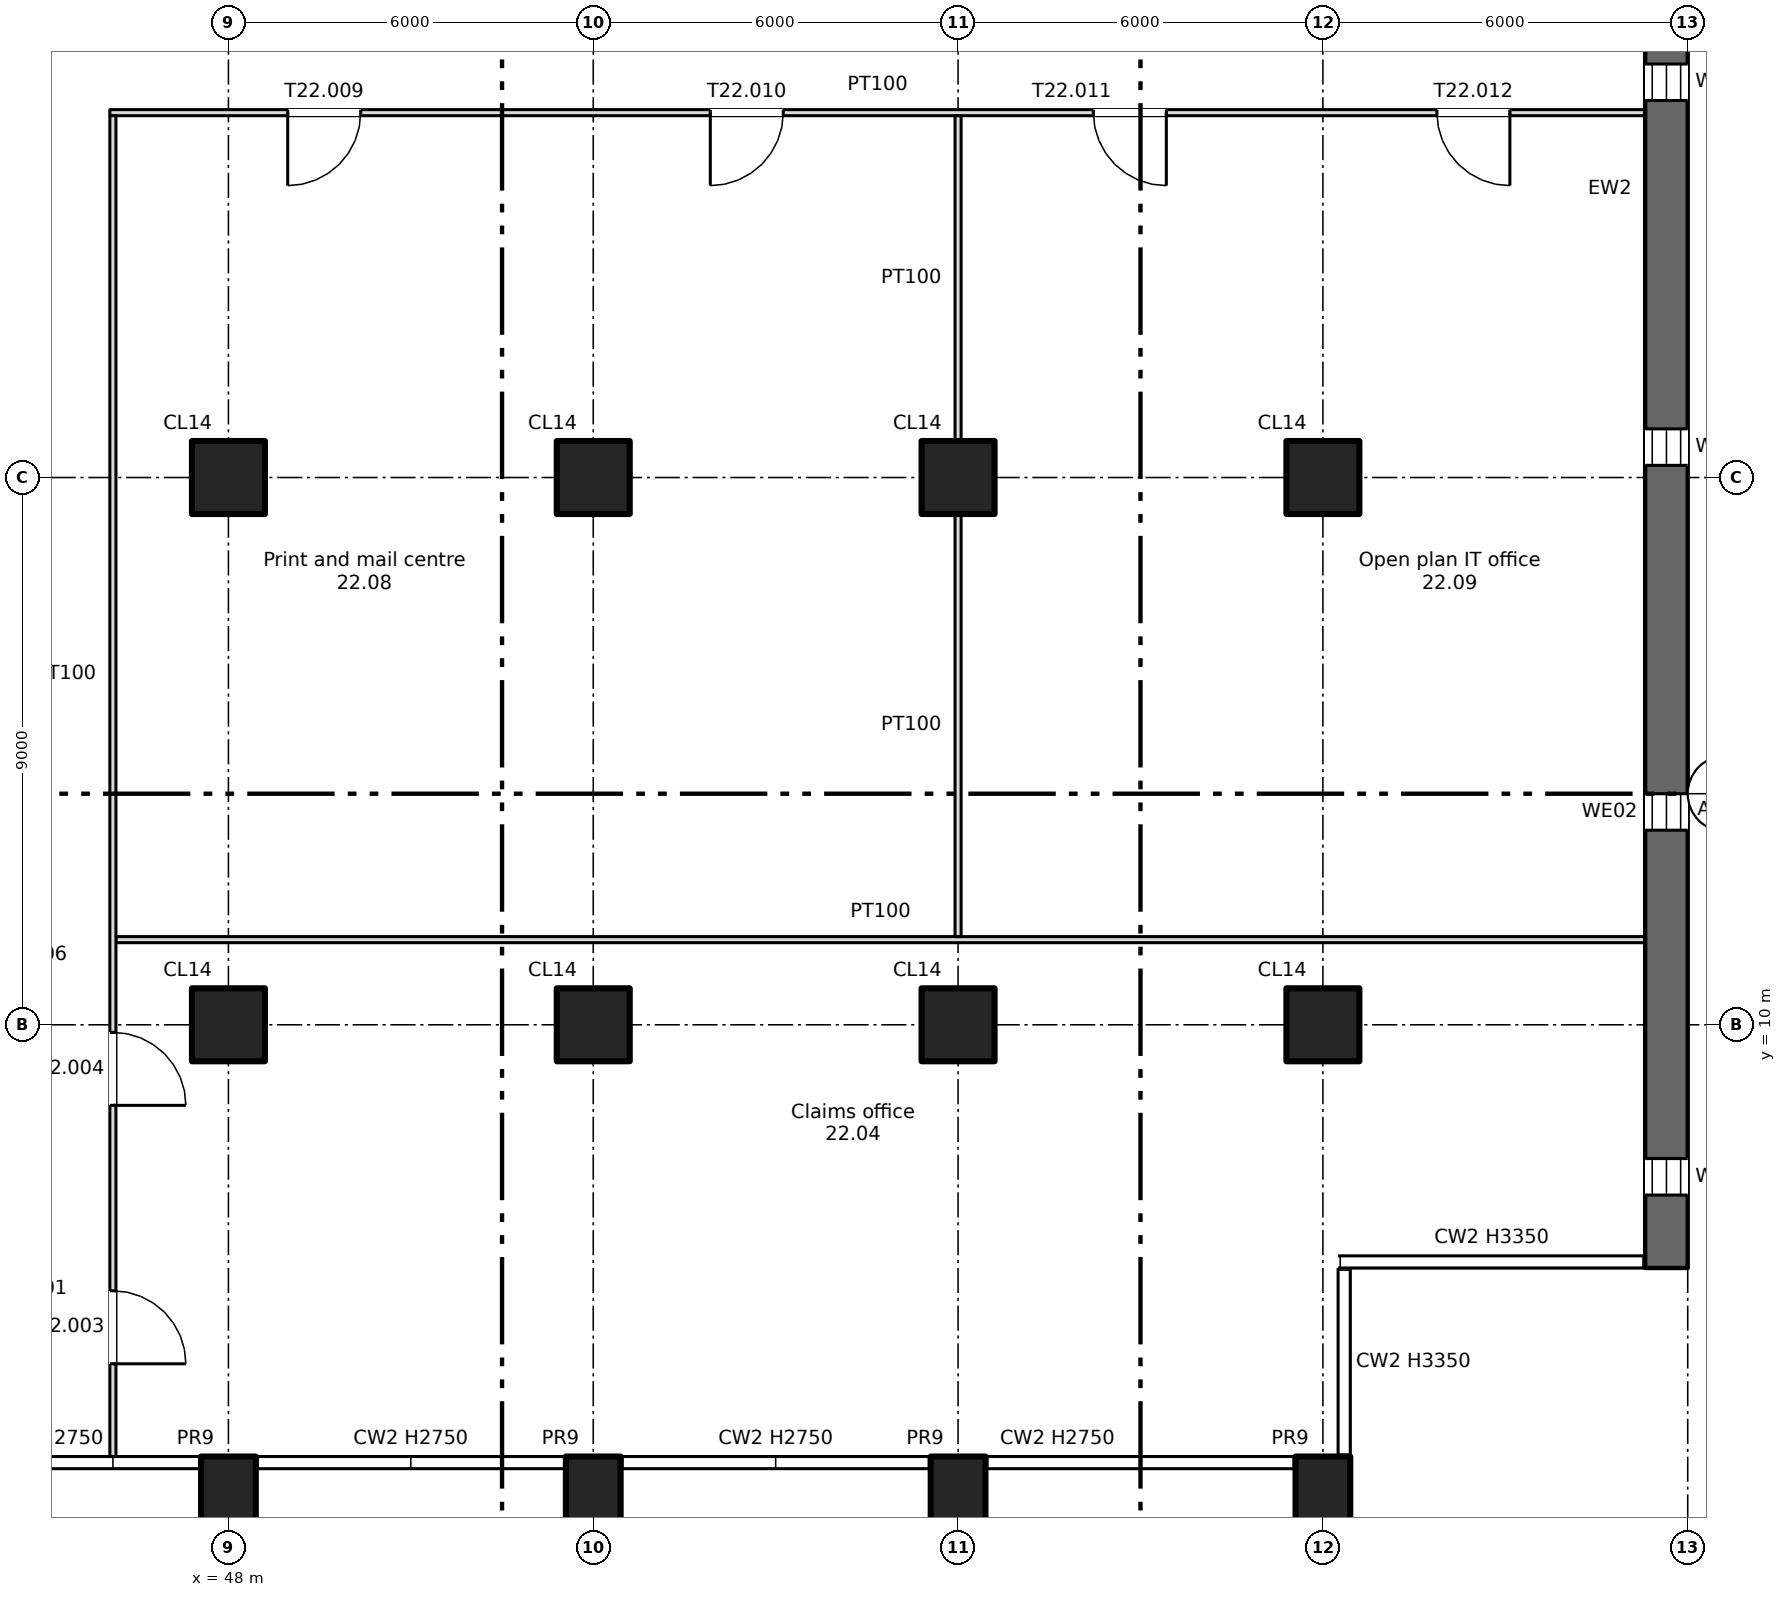
"""IFC4 building model, lengths in metres.
Left out: names, types, materials, properties, quantities, classifications, styles, units other than length and angle.
Written with IfcOpenShell. Run it as: python <this file> out.ifc"""

import sys

from ifc_helpers import new_model, si_unit, direction, frame, frame_2d, origin, origin_2d, place, context, subcontext, project, spatial, rectangle, extrude, element, fill, save


model = new_model("IFC4")
c1 = context("Model", 3, precision=1e-05, world=origin(), true_north=direction((0.0, 1.0)))
c2 = subcontext(c1, "Body", "Model", "MODEL_VIEW")
j1 = project(units=[si_unit("LENGTHUNIT", "METRE"), si_unit("PLANEANGLEUNIT", "RADIAN")], contexts=[c1])
p1 = place(None, origin())
s1 = spatial("IfcSite", under=j1, at=p1, CompositionType="ELEMENT")
p2 = place(p1, origin())
s2 = spatial("IfcBuilding", under=s1, at=p2, CompositionType="ELEMENT")
p3 = place(p2, frame((0.0, 0.0, 147.5)))
s3 = spatial("IfcBuildingStorey", under=s2, at=p3, CompositionType="ELEMENT", Elevation=147.5)
for number, where, z_axis, x_axis in (
    (1, (48.0, 2.2, -0.4), (0.0, 0.0, 1.0), (1.0, 0.0, 0.0)),
    (2, (54.0, 2.2, -0.4), (0.0, 0.0, 1.0), (1.0, 0.0, 0.0)),
    (3, (60.0, 2.2, -0.4), (0.0, 0.0, 1.0), (1.0, 0.0, 0.0)),
    (4, (66.0, 2.2, -0.4), (0.0, 0.0, 1.0), (1.0, 0.0, 0.0)),
):
    element("IfcColumn", number, at=place(p3, frame(where, z_axis=z_axis, x_axis=x_axis)), inside=s3, PredefinedType="COLUMN", context=c2, shape_type="SweptSolid", body=[
        extrude(rectangle(XDim=0.9, YDim=1.4, at=origin_2d()), origin(), (0.0, 0.0, 1.0), 3.75),
    ])
for number, where, z_axis, x_axis in (
    (5, (48.0, 10.0, 0.0), (0.0, 0.0, 1.0), (1.0, 0.0, 0.0)),
    (6, (48.0, 19.0, 0.0), (0.0, 0.0, 1.0), (1.0, 0.0, 0.0)),
    (7, (54.0, 10.0, 0.0), (0.0, 0.0, 1.0), (1.0, 0.0, 0.0)),
    (8, (54.0, 19.0, 0.0), (0.0, 0.0, 1.0), (1.0, 0.0, 0.0)),
    (9, (60.0, 10.0, 0.0), (0.0, 0.0, 1.0), (1.0, 0.0, 0.0)),
    (10, (60.0, 19.0, 0.0), (0.0, 0.0, 1.0), (1.0, 0.0, 0.0)),
    (11, (66.0, 10.0, 0.0), (0.0, 0.0, 1.0), (1.0, 0.0, 0.0)),
    (12, (66.0, 19.0, 0.0), (0.0, 0.0, 1.0), (1.0, 0.0, 0.0)),
):
    element("IfcColumn", number, at=place(p3, frame(where, z_axis=z_axis, x_axis=x_axis)), inside=s3, PredefinedType="COLUMN", context=c2, shape_type="SweptSolid", body=[
        extrude(rectangle(XDim=1.2, YDim=1.2, at=origin_2d()), origin(), (0.0, 0.0, 1.0), 3.35),
    ])
p4 = place(p3, frame((71.65, 6.0, 0.0), z_axis=(0.0, 0.0, 1.0), x_axis=(0.0, 1.0, 0.0)))
e13 = element("IfcWall", 13, at=p4, inside=s3, PredefinedType="SHEAR", context=c2, shape_type="SweptSolid", body=[
    extrude(rectangle(XDim=35.5, YDim=0.7, at=frame_2d((17.75, 0.0))), origin(), (0.0, 0.0, 1.0), 3.35),
])
p5 = place(p4, frame((1.2, 0.0, 0.6)))
e14 = element("IfcOpeningElement", 14, at=p5, cuts=e13, PredefinedType="OPENING", context=c2, shape_type="SweptSolid", body=[
    extrude(rectangle(XDim=0.6, YDim=2.4, at=frame_2d((0.3, 1.2))), frame((0.0, 0.36, 0.0), z_axis=(0.0, -1.0, 0.0), x_axis=(1.0, 0.0, 0.0)), (0.0, 0.0, 1.0), 0.72),
])
p6 = place(p4, frame((7.2, 0.0, 0.6)))
e15 = element("IfcOpeningElement", 15, at=p6, cuts=e13, PredefinedType="OPENING", context=c2, shape_type="SweptSolid", body=[
    extrude(rectangle(XDim=0.6, YDim=2.4, at=frame_2d((0.3, 1.2))), frame((0.0, 0.36, 0.0), z_axis=(0.0, -1.0, 0.0), x_axis=(1.0, 0.0, 0.0)), (0.0, 0.0, 1.0), 0.72),
])
p7 = place(p4, frame((13.2, 0.0, 0.6)))
e16 = element("IfcOpeningElement", 16, at=p7, cuts=e13, PredefinedType="OPENING", context=c2, shape_type="SweptSolid", body=[
    extrude(rectangle(XDim=0.6, YDim=2.4, at=frame_2d((0.3, 1.2))), frame((0.0, 0.36, 0.0), z_axis=(0.0, -1.0, 0.0), x_axis=(1.0, 0.0, 0.0)), (0.0, 0.0, 1.0), 0.72),
])
p8 = place(p4, frame((19.2, 0.0, 0.6)))
e17 = element("IfcOpeningElement", 17, at=p8, cuts=e13, PredefinedType="OPENING", context=c2, shape_type="SweptSolid", body=[
    extrude(rectangle(XDim=0.6, YDim=2.4, at=frame_2d((0.3, 1.2))), frame((0.0, 0.36, 0.0), z_axis=(0.0, -1.0, 0.0), x_axis=(1.0, 0.0, 0.0)), (0.0, 0.0, 1.0), 0.72),
])
p9 = place(p4, frame((25.2, 0.0, 0.6)))
e18 = element("IfcOpeningElement", 18, at=p9, cuts=e13, PredefinedType="OPENING", context=c2, shape_type="SweptSolid", body=[
    extrude(rectangle(XDim=0.6, YDim=2.4, at=frame_2d((0.3, 1.2))), frame((0.0, 0.36, 0.0), z_axis=(0.0, -1.0, 0.0), x_axis=(1.0, 0.0, 0.0)), (0.0, 0.0, 1.0), 0.72),
])
p10 = place(p4, frame((31.2, 0.0, 0.6)))
e19 = element("IfcOpeningElement", 19, at=p10, cuts=e13, PredefinedType="OPENING", context=c2, shape_type="SweptSolid", body=[
    extrude(rectangle(XDim=0.6, YDim=2.4, at=frame_2d((0.3, 1.2))), frame((0.0, 0.36, 0.0), z_axis=(0.0, -1.0, 0.0), x_axis=(1.0, 0.0, 0.0)), (0.0, 0.0, 1.0), 0.72),
])
p11 = place(p3, frame((46.15, 11.4, 0.0), z_axis=(0.0, 0.0, 1.0), x_axis=(1.0, 0.0, 0.0)))
e20 = element("IfcWall", 20, at=p11, inside=s3, PredefinedType="PARTITIONING", context=c2, shape_type="SweptSolid", body=[
    extrude(rectangle(XDim=25.15, YDim=0.1, at=frame_2d((12.575, 0.0))), origin(), (0.0, 0.0, 1.0), 3.35),
])
p12 = place(p3, frame((46.05, 25.0, 0.0), z_axis=(0.0, 0.0, 1.0), x_axis=(1.0, 0.0, 0.0)))
e21 = element("IfcWall", 21, at=p12, inside=s3, PredefinedType="PARTITIONING", context=c2, shape_type="SweptSolid", body=[
    extrude(rectangle(XDim=25.25, YDim=0.1, at=frame_2d((12.625, 0.0))), origin(), (0.0, 0.0, 1.0), 3.35),
])
p13 = place(p12, frame((2.925, 0.0, 0.0)))
e22 = element("IfcOpeningElement", 22, at=p13, cuts=e21, PredefinedType="OPENING", context=c2, shape_type="SweptSolid", body=[
    extrude(rectangle(XDim=1.2, YDim=2.1, at=frame_2d((0.6, 1.05))), frame((0.0, 0.06, 0.0), z_axis=(0.0, -1.0, 0.0), x_axis=(1.0, 0.0, 0.0)), (0.0, 0.0, 1.0), 0.12),
])
p14 = place(p12, frame((9.875, 0.0, 0.0)))
e23 = element("IfcOpeningElement", 23, at=p14, cuts=e21, PredefinedType="OPENING", context=c2, shape_type="SweptSolid", body=[
    extrude(rectangle(XDim=1.2, YDim=2.1, at=frame_2d((0.6, 1.05))), frame((0.0, 0.06, 0.0), z_axis=(0.0, -1.0, 0.0), x_axis=(1.0, 0.0, 0.0)), (0.0, 0.0, 1.0), 0.12),
])
p15 = place(p12, frame((16.175, 0.0, 0.0)))
e24 = element("IfcOpeningElement", 24, at=p15, cuts=e21, PredefinedType="OPENING", context=c2, shape_type="SweptSolid", body=[
    extrude(rectangle(XDim=1.2, YDim=2.1, at=frame_2d((0.6, 1.05))), frame((0.0, 0.06, 0.0), z_axis=(0.0, -1.0, 0.0), x_axis=(1.0, 0.0, 0.0)), (0.0, 0.0, 1.0), 0.12),
])
p16 = place(p12, frame((21.825, 0.0, 0.0)))
e25 = element("IfcOpeningElement", 25, at=p16, cuts=e21, PredefinedType="OPENING", context=c2, shape_type="SweptSolid", body=[
    extrude(rectangle(XDim=1.2, YDim=2.1, at=frame_2d((0.6, 1.05))), frame((0.0, 0.06, 0.0), z_axis=(0.0, -1.0, 0.0), x_axis=(1.0, 0.0, 0.0)), (0.0, 0.0, 1.0), 0.12),
])
p17 = place(p3, frame((46.1, 2.9, 0.0), z_axis=(0.0, 0.0, 1.0), x_axis=(0.0, 1.0, 0.0)))
e26 = element("IfcWall", 26, at=p17, inside=s3, PredefinedType="PARTITIONING", context=c2, shape_type="SweptSolid", body=[
    extrude(rectangle(XDim=22.05, YDim=0.1, at=frame_2d((11.025, 0.0))), origin(), (0.0, 0.0, 1.0), 3.35),
])
p18 = place(p17, frame((1.525, 0.0, 0.0)))
e27 = element("IfcOpeningElement", 27, at=p18, cuts=e26, PredefinedType="OPENING", context=c2, shape_type="SweptSolid", body=[
    extrude(rectangle(XDim=1.2, YDim=2.1, at=frame_2d((0.6, 1.05))), frame((0.0, 0.06, 0.0), z_axis=(0.0, -1.0, 0.0), x_axis=(1.0, 0.0, 0.0)), (0.0, 0.0, 1.0), 0.12),
])
p19 = place(p17, frame((5.775, 0.0, 0.0)))
e28 = element("IfcOpeningElement", 28, at=p19, cuts=e26, PredefinedType="OPENING", context=c2, shape_type="SweptSolid", body=[
    extrude(rectangle(XDim=1.2, YDim=2.1, at=frame_2d((0.6, 1.05))), frame((0.0, 0.06, 0.0), z_axis=(0.0, -1.0, 0.0), x_axis=(1.0, 0.0, 0.0)), (0.0, 0.0, 1.0), 0.12),
])
p20 = place(p3, frame((60.0, 11.45, 0.0), z_axis=(0.0, 0.0, 1.0), x_axis=(0.0, 1.0, 0.0)))
e29 = element("IfcWall", 29, at=p20, inside=s3, PredefinedType="PARTITIONING", context=c2, shape_type="SweptSolid", body=[
    extrude(rectangle(XDim=6.95, YDim=0.1, at=frame_2d((3.475, 0.0))), origin(), (0.0, 0.0, 1.0), 3.35),
])
p21 = place(p3, frame((60.0, 19.6, 0.0), z_axis=(0.0, 0.0, 1.0), x_axis=(0.0, 1.0, 0.0)))
e30 = element("IfcWall", 30, at=p21, inside=s3, PredefinedType="PARTITIONING", context=c2, shape_type="SweptSolid", body=[
    extrude(rectangle(XDim=5.35, YDim=0.1, at=frame_2d((2.675, 0.0))), origin(), (0.0, 0.0, 1.0), 3.35),
])
p22 = place(p5, origin())
e31 = element("IfcWindow", 31, at=p22, inside=s3, PartitioningType="SINGLE_PANEL", PredefinedType="WINDOW", context=c2, shape_type="SweptSolid", body=[
    extrude(rectangle(XDim=0.6, YDim=2.4, at=frame_2d((0.3, 1.2))), frame((0.0, 0.03, 0.0), z_axis=(0.0, -1.0, 0.0), x_axis=(1.0, 0.0, 0.0)), (0.0, 0.0, 1.0), 0.06),
])
fill(e14, e31)
p23 = place(p6, origin())
e32 = element("IfcWindow", 32, at=p23, inside=s3, PartitioningType="SINGLE_PANEL", PredefinedType="WINDOW", context=c2, shape_type="SweptSolid", body=[
    extrude(rectangle(XDim=0.6, YDim=2.4, at=frame_2d((0.3, 1.2))), frame((0.0, 0.03, 0.0), z_axis=(0.0, -1.0, 0.0), x_axis=(1.0, 0.0, 0.0)), (0.0, 0.0, 1.0), 0.06),
])
fill(e15, e32)
p24 = place(p7, origin())
e33 = element("IfcWindow", 33, at=p24, inside=s3, PartitioningType="SINGLE_PANEL", PredefinedType="WINDOW", context=c2, shape_type="SweptSolid", body=[
    extrude(rectangle(XDim=0.6, YDim=2.4, at=frame_2d((0.3, 1.2))), frame((0.0, 0.03, 0.0), z_axis=(0.0, -1.0, 0.0), x_axis=(1.0, 0.0, 0.0)), (0.0, 0.0, 1.0), 0.06),
])
fill(e16, e33)
p25 = place(p8, origin())
e34 = element("IfcWindow", 34, at=p25, inside=s3, PartitioningType="SINGLE_PANEL", PredefinedType="WINDOW", context=c2, shape_type="SweptSolid", body=[
    extrude(rectangle(XDim=0.6, YDim=2.4, at=frame_2d((0.3, 1.2))), frame((0.0, 0.03, 0.0), z_axis=(0.0, -1.0, 0.0), x_axis=(1.0, 0.0, 0.0)), (0.0, 0.0, 1.0), 0.06),
])
fill(e17, e34)
p26 = place(p18, origin())
e35 = element("IfcDoor", 35, at=p26, inside=s3, OperationType="SINGLE_SWING_LEFT", PredefinedType="DOOR", context=c2, shape_type="SweptSolid", body=[
    extrude(rectangle(XDim=1.2, YDim=2.1, at=frame_2d((0.6, 1.05))), frame((0.0, 0.025, 0.0), z_axis=(0.0, -1.0, 0.0), x_axis=(1.0, 0.0, 0.0)), (0.0, 0.0, 1.0), 0.05),
])
fill(e27, e35)
p27 = place(p19, origin())
e36 = element("IfcDoor", 36, at=p27, inside=s3, OperationType="SINGLE_SWING_LEFT", PredefinedType="DOOR", context=c2, shape_type="SweptSolid", body=[
    extrude(rectangle(XDim=1.2, YDim=2.1, at=frame_2d((0.6, 1.05))), frame((0.0, 0.025, 0.0), z_axis=(0.0, -1.0, 0.0), x_axis=(1.0, 0.0, 0.0)), (0.0, 0.0, 1.0), 0.05),
])
fill(e28, e36)
p28 = place(p13, origin())
e37 = element("IfcDoor", 37, at=p28, inside=s3, OperationType="SINGLE_SWING_LEFT", PredefinedType="DOOR", context=c2, shape_type="SweptSolid", body=[
    extrude(rectangle(XDim=1.2, YDim=2.1, at=frame_2d((0.6, 1.05))), frame((0.0, 0.025, 0.0), z_axis=(0.0, -1.0, 0.0), x_axis=(1.0, 0.0, 0.0)), (0.0, 0.0, 1.0), 0.05),
])
fill(e22, e37)
p29 = place(p14, origin())
e38 = element("IfcDoor", 38, at=p29, inside=s3, OperationType="SINGLE_SWING_LEFT", PredefinedType="DOOR", context=c2, shape_type="SweptSolid", body=[
    extrude(rectangle(XDim=1.2, YDim=2.1, at=frame_2d((0.6, 1.05))), frame((0.0, 0.025, 0.0), z_axis=(0.0, -1.0, 0.0), x_axis=(1.0, 0.0, 0.0)), (0.0, 0.0, 1.0), 0.05),
])
fill(e23, e38)
p30 = place(p15, origin())
e39 = element("IfcDoor", 39, at=p30, inside=s3, OperationType="SINGLE_SWING_RIGHT", PredefinedType="DOOR", context=c2, shape_type="SweptSolid", body=[
    extrude(rectangle(XDim=1.2, YDim=2.1, at=frame_2d((0.6, 1.05))), frame((0.0, 0.025, 0.0), z_axis=(0.0, -1.0, 0.0), x_axis=(1.0, 0.0, 0.0)), (0.0, 0.0, 1.0), 0.05),
])
fill(e24, e39)
p31 = place(p16, origin())
e40 = element("IfcDoor", 40, at=p31, inside=s3, OperationType="SINGLE_SWING_RIGHT", PredefinedType="DOOR", context=c2, shape_type="SweptSolid", body=[
    extrude(rectangle(XDim=1.2, YDim=2.1, at=frame_2d((0.6, 1.05))), frame((0.0, 0.025, 0.0), z_axis=(0.0, -1.0, 0.0), x_axis=(1.0, 0.0, 0.0)), (0.0, 0.0, 1.0), 0.05),
])
fill(e25, e40)
save(model, sys.argv[1])
